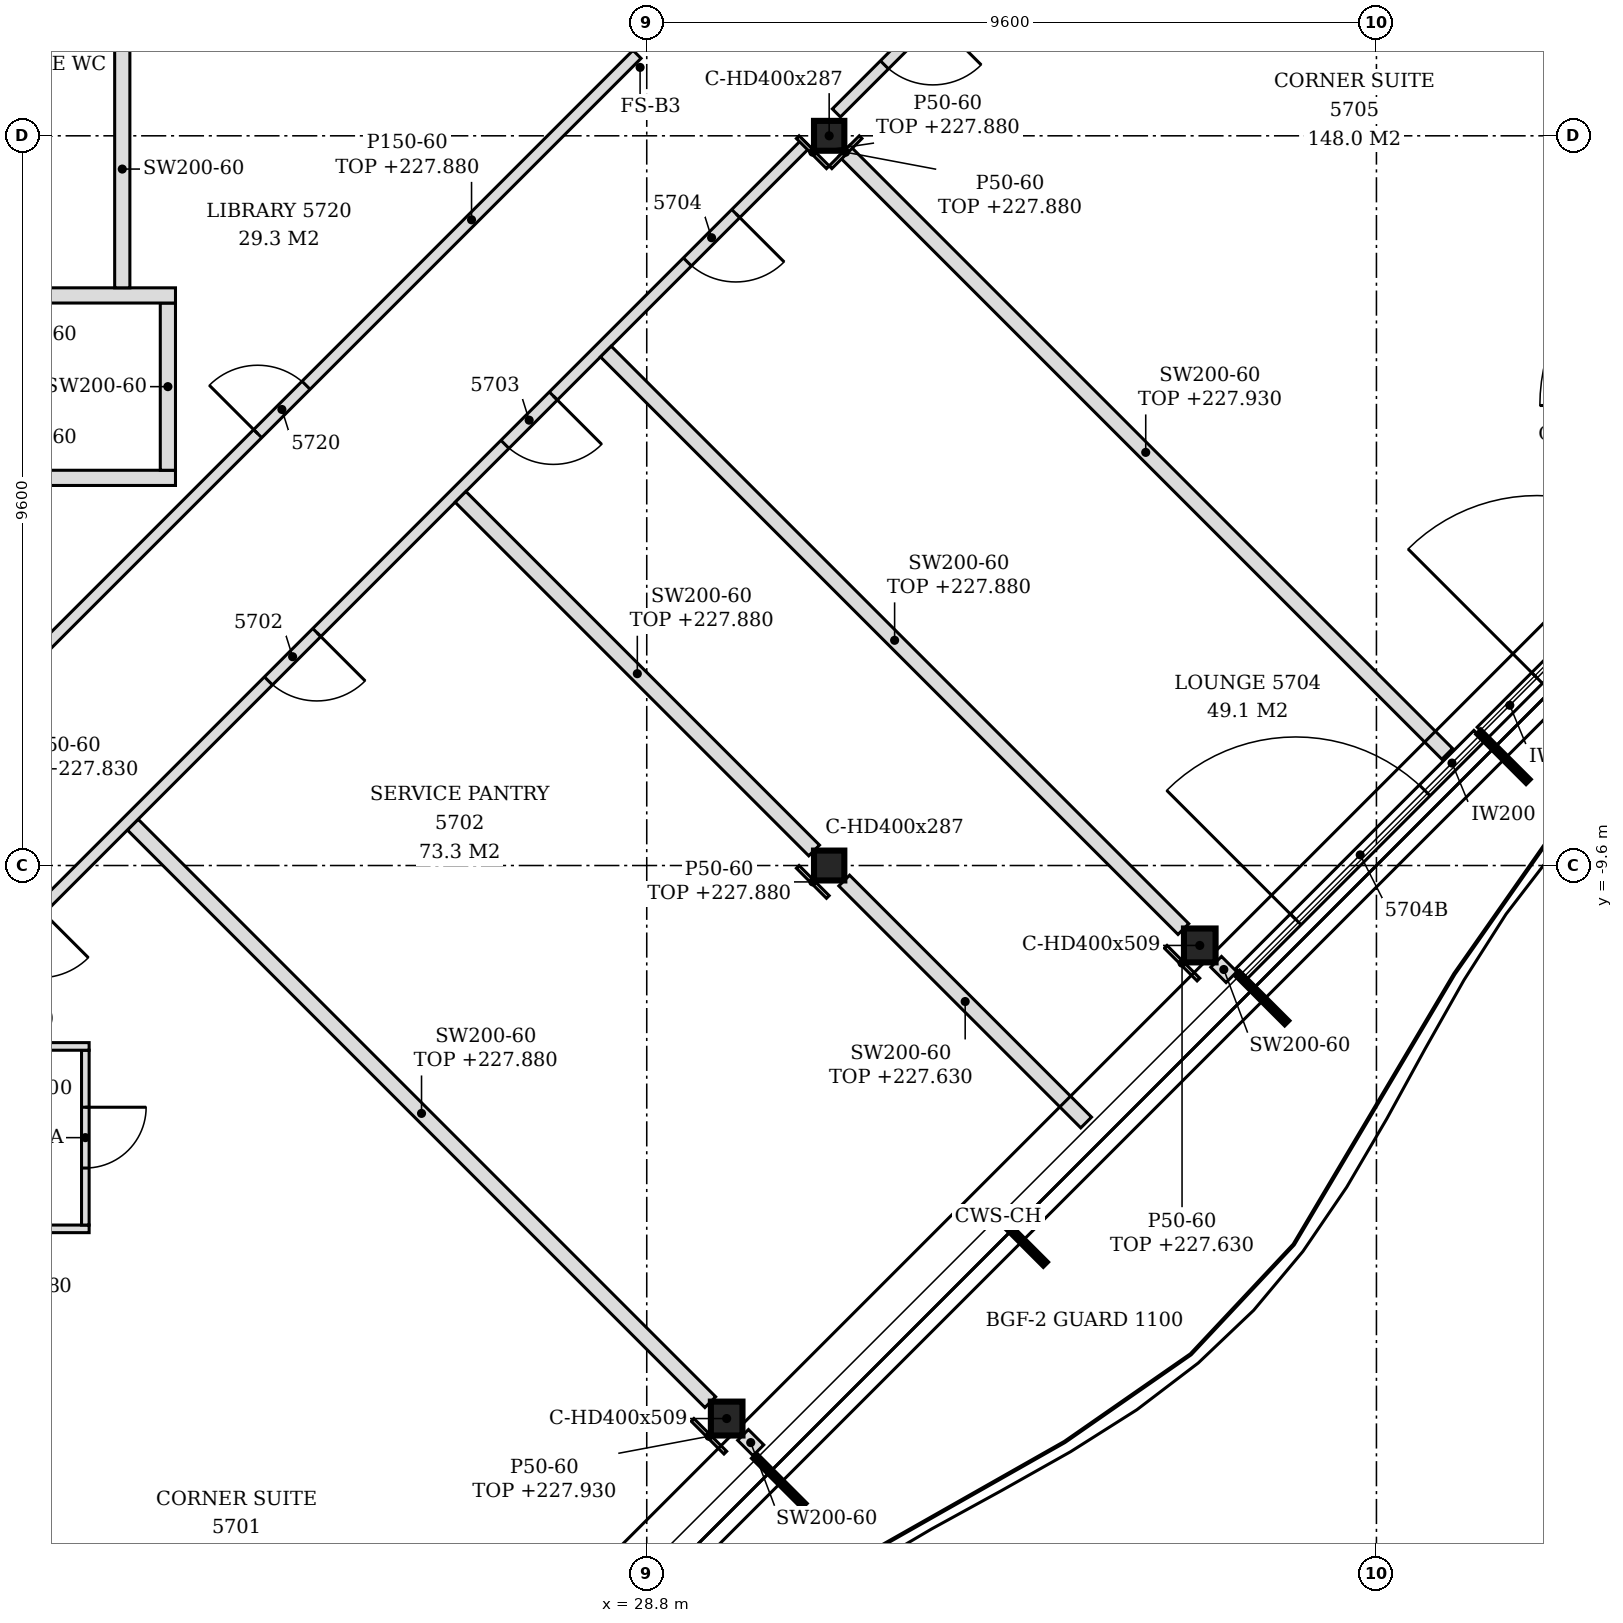
"""IFC4 building model, lengths in metres.
Left out: names, types, materials, properties, quantities, classifications, styles, units other than length and angle.
Written with IfcOpenShell. Run it as: python <this file> out.ifc"""

import sys

from ifc_helpers import new_model, si_unit, direction, frame, frame_2d, origin, origin_2d, place, context, subcontext, project, spatial, polyline, rectangle, i_section, outline, extrude, element, fill, save


model = new_model("IFC4")
c1 = context("Model", 3, precision=1e-05, world=origin(), true_north=direction((0.0, 1.0)))
c2 = subcontext(c1, "Body", "Model", "MODEL_VIEW")
j1 = project(units=[si_unit("LENGTHUNIT", "METRE"), si_unit("PLANEANGLEUNIT", "RADIAN")], contexts=[c1])
p1 = place(None, origin())
s1 = spatial("IfcSite", under=j1, at=p1, CompositionType="ELEMENT")
p2 = place(p1, origin())
s2 = spatial("IfcBuilding", under=s1, at=p2, CompositionType="ELEMENT")
p3 = place(p2, frame((0.0, 0.0, 225.0)))
s3 = spatial("IfcBuildingStorey", under=s2, at=p3, CompositionType="ELEMENT", Elevation=225.0)
for number, where, z_axis, x_axis in (
    (1, (29.852, -16.876, -0.15), (0.0, 0.0, 1.0), (1.0, 0.0, 0.0)),
    (2, (36.076, -10.652, -0.15), (0.0, 0.0, 1.0), (1.0, 0.0, 0.0)),
):
    element("IfcColumn", number, at=place(p3, frame(where, z_axis=z_axis, x_axis=x_axis)), inside=s3, PredefinedType="COLUMN", context=c2, shape_type="SweptSolid", body=[
        extrude(i_section(OverallWidth=0.416, OverallDepth=0.446, WebThickness=0.039, FlangeThickness=0.063, FilletRadius=0.015, at=origin_2d()), origin(), (0.0, 0.0, 1.0), 3.6),
    ])
for number, where, z_axis, x_axis in (
    (3, (31.2, -9.6, -0.15), (0.0, 0.0, 1.0), (1.0, 0.0, 0.0)),
    (4, (31.2, 0.0, -0.15), (0.0, 0.0, 1.0), (1.0, 0.0, 0.0)),
):
    element("IfcColumn", number, at=place(p3, frame(where, z_axis=z_axis, x_axis=x_axis)), inside=s3, PredefinedType="COLUMN", context=c2, shape_type="SweptSolid", body=[
        extrude(i_section(OverallWidth=0.399, OverallDepth=0.393, WebThickness=0.023, FlangeThickness=0.037, FilletRadius=0.015, at=origin_2d()), origin(), (0.0, 0.0, 1.0), 3.6),
    ])
p4 = place(p3, frame((36.62, -11.026, 0.0), z_axis=(0.0, 0.0, 1.0), x_axis=(0.707106781187, 0.707106781187, 0.0)))
e5 = element("IfcWall", 5, at=p4, inside=s3, PredefinedType="NOTDEFINED", context=c2, shape_type="SweptSolid", body=[
    extrude(rectangle(XDim=4.431, YDim=0.2, at=frame_2d((2.215, 0.0))), origin(), (0.0, 0.0, 1.0), 3.45),
])
p5 = place(p4, frame((1.015, 0.0, 0.0)))
e6 = element("IfcOpeningElement", 6, at=p5, cuts=e5, PredefinedType="OPENING", context=c2, shape_type="SweptSolid", body=[
    extrude(rectangle(XDim=2.4, YDim=2.4, at=frame_2d((1.2, 1.2))), frame((0.0, 0.11, 0.0), z_axis=(0.0, -1.0, 0.0), x_axis=(1.0, 0.0, 0.0)), (0.0, 0.0, 1.0), 0.22),
])
p6 = place(p3, frame((39.796, -7.851, 0.0), z_axis=(0.0, 0.0, 1.0), x_axis=(0.707079168996, 0.707134392299, 0.0)))
e7 = element("IfcWall", 7, at=p6, inside=s3, PredefinedType="NOTDEFINED", context=c2, shape_type="SweptSolid", body=[
    extrude(rectangle(XDim=4.421, YDim=0.2, at=frame_2d((2.21, 0.0))), origin(), (0.0, 0.0, 1.0), 3.45),
])
p7 = place(p6, frame((1.015, 0.0, 0.0)))
e8 = element("IfcOpeningElement", 8, at=p7, cuts=e7, PredefinedType="OPENING", context=c2, shape_type="SweptSolid", body=[
    extrude(rectangle(XDim=2.4, YDim=2.4, at=frame_2d((1.2, 1.2))), frame((0.0, 0.11, 0.0), z_axis=(0.0, -1.0, 0.0), x_axis=(1.0, 0.0, 0.0)), (0.0, 0.0, 1.0), 0.22),
])
p8 = place(p3, frame((30.269, -17.293, 0.0), z_axis=(0.0, 0.0, 1.0), x_axis=(-0.707106781187, 0.707106781187, 0.0)))
e9 = element("IfcWall", 9, at=p8, inside=s3, PredefinedType="PARTITIONING", context=c2, shape_type="SweptSolid", body=[
    extrude(rectangle(XDim=0.285, YDim=0.2, at=frame_2d((0.143, 0.0))), origin(), (0.0, 0.0, 1.0), 3.45),
])
p9 = place(p3, frame((29.636, -16.66, 0.0), z_axis=(0.0, 0.0, 1.0), x_axis=(-0.707095420673, 0.707118141518, 0.0)))
e10 = element("IfcWall", 10, at=p9, inside=s3, PredefinedType="PARTITIONING", context=c2, shape_type="SweptSolid", body=[
    extrude(rectangle(XDim=10.745, YDim=0.2, at=frame_2d((5.373, 0.0))), origin(), (0.0, 0.0, 1.0), 2.88),
])
p10 = place(p3, frame((19.114, -14.38, 0.0), z_axis=(0.0, 0.0, 1.0), x_axis=(1.0, 0.0, 0.0)))
e11 = element("IfcWall", 11, at=p10, inside=s3, PredefinedType="PARTITIONING", context=c2, shape_type="SweptSolid", body=[
    extrude(outline(polyline([(0.0, 0.0), (2.35, 0.0), (2.35, 2.88), (0.236, 2.88), (0.234, 2.73), (0.0, 2.73), (0.0, 0.0)])), frame((0.0, 0.05, 0.0), z_axis=(0.0, -1.0, 0.0), x_axis=(1.0, 0.0, 0.0)), (0.0, 0.0, 1.0), 0.1),
])
p11 = place(p3, frame((16.722, -14.272, 0.0), z_axis=(0.0, 0.0, 1.0), x_axis=(0.707106781187, 0.707106781187, 0.0)))
e12 = element("IfcWall", 12, at=p11, inside=s3, PredefinedType="PARTITIONING", context=c2, shape_type="SweptSolid", body=[
    extrude(rectangle(XDim=20.049, YDim=0.15, at=frame_2d((10.025, 0.0))), origin(), (0.0, 0.0, 1.0), 2.73),
])
p12 = place(p11, frame((4.892, 0.0, 0.0)))
e13 = element("IfcOpeningElement", 13, at=p12, cuts=e12, PredefinedType="OPENING", context=c2, shape_type="SweptSolid", body=[
    extrude(rectangle(XDim=0.9, YDim=2.1, at=frame_2d((0.45, 1.05))), frame((0.0, 0.085, 0.0), z_axis=(0.0, -1.0, 0.0), x_axis=(1.0, 0.0, 0.0)), (0.0, 0.0, 1.0), 0.17),
])
p13 = place(p11, frame((10.042, 0.0, 0.0)))
e14 = element("IfcOpeningElement", 14, at=p13, cuts=e12, PredefinedType="OPENING", context=c2, shape_type="SweptSolid", body=[
    extrude(rectangle(XDim=0.9, YDim=2.1, at=frame_2d((0.45, 1.05))), frame((0.0, 0.085, 0.0), z_axis=(0.0, -1.0, 0.0), x_axis=(1.0, 0.0, 0.0)), (0.0, 0.0, 1.0), 0.17),
])
p14 = place(p11, frame((14.443, 0.0, 0.0)))
e15 = element("IfcOpeningElement", 15, at=p14, cuts=e12, PredefinedType="OPENING", context=c2, shape_type="SweptSolid", body=[
    extrude(rectangle(XDim=0.9, YDim=2.1, at=frame_2d((0.45, 1.05))), frame((0.0, 0.085, 0.0), z_axis=(0.0, -1.0, 0.0), x_axis=(1.0, 0.0, 0.0)), (0.0, 0.0, 1.0), 0.17),
])
p15 = place(p11, frame((17.837, 0.0, 0.0)))
e16 = element("IfcOpeningElement", 16, at=p15, cuts=e12, PredefinedType="OPENING", context=c2, shape_type="SweptSolid", body=[
    extrude(rectangle(XDim=0.9, YDim=2.1, at=frame_2d((0.45, 1.05))), frame((0.0, 0.085, 0.0), z_axis=(0.0, -1.0, 0.0), x_axis=(1.0, 0.0, 0.0)), (0.0, 0.0, 1.0), 0.17),
])
p16 = place(p3, frame((21.414, -14.33, 0.0), z_axis=(0.0, 0.0, 1.0), x_axis=(0.0, 1.0, 0.0)))
e17 = element("IfcWall", 17, at=p16, inside=s3, PredefinedType="PARTITIONING", context=c2, shape_type="SweptSolid", body=[
    extrude(outline(polyline([(0.0, 0.0), (2.3, 0.0), (2.3, 3.45), (0.035, 3.45), (0.033, 2.88), (0.0, 2.88), (0.0, 0.0)])), frame((0.0, 0.05, 0.0), z_axis=(0.0, -1.0, 0.0), x_axis=(1.0, 0.0, 0.0)), (0.0, 0.0, 1.0), 0.1),
])
p17 = place(p16, frame((0.75, 0.0, 0.0)))
e18 = element("IfcOpeningElement", 18, at=p17, cuts=e17, PredefinedType="OPENING", context=c2, shape_type="SweptSolid", body=[
    extrude(rectangle(XDim=0.8, YDim=2.1, at=frame_2d((0.4, 1.05))), frame((0.0, 0.06, 0.0), z_axis=(0.0, -1.0, 0.0), x_axis=(1.0, 0.0, 0.0)), (0.0, 0.0, 1.0), 0.12),
])
p18 = place(p3, frame((34.581, -12.981, 0.0), z_axis=(0.0, 0.0, 1.0), x_axis=(-0.707133900936, 0.707079660397, 0.0)))
e19 = element("IfcWall", 19, at=p18, inside=s3, PredefinedType="PARTITIONING", context=c2, shape_type="SweptSolid", body=[
    extrude(rectangle(XDim=4.501, YDim=0.2, at=frame_2d((2.25, 0.0))), origin(), (0.0, 0.0, 1.0), 2.63),
])
p19 = place(p3, frame((19.17, -11.98, 0.0), z_axis=(0.0, 0.0, 1.0), x_axis=(1.0, 0.0, 0.0)))
e20 = element("IfcWall", 20, at=p19, inside=s3, PredefinedType="PARTITIONING", context=c2, shape_type="SweptSolid", body=[
    extrude(outline(polyline([(0.0, 0.0), (2.294, 0.0), (2.294, 3.45), (0.18, 3.45), (0.178, 2.73), (0.0, 2.73), (0.0, 0.0)])), frame((0.0, 0.05, 0.0), z_axis=(0.0, -1.0, 0.0), x_axis=(1.0, 0.0, 0.0)), (0.0, 0.0, 1.0), 0.1),
])
p20 = place(p3, frame((36.493, -11.069, 0.0), z_axis=(0.0, 0.0, 1.0), x_axis=(-0.707534423513, 0.706678880075, 0.0)))
e21 = element("IfcWall", 21, at=p20, inside=s3, PredefinedType="PARTITIONING", context=c2, shape_type="SweptSolid", body=[
    extrude(rectangle(XDim=0.285, YDim=0.2, at=frame_2d((0.143, 0.0))), origin(), (0.0, 0.0, 1.0), 3.45),
])
p21 = place(p3, frame((35.86, -10.436, 0.0), z_axis=(0.0, 0.0, 1.0), x_axis=(-0.707106781187, 0.707106781187, 0.0)))
e22 = element("IfcWall", 22, at=p21, inside=s3, PredefinedType="PARTITIONING", context=c2, shape_type="SweptSolid", body=[
    extrude(rectangle(XDim=10.745, YDim=0.2, at=frame_2d((5.373, 0.0))), origin(), (0.0, 0.0, 1.0), 2.88),
])
p22 = place(p3, frame((31.002, -9.402, 0.0), z_axis=(0.0, 0.0, 1.0), x_axis=(-0.707088226093, 0.707125335793, 0.0)))
e23 = element("IfcWall", 23, at=p22, inside=s3, PredefinedType="PARTITIONING", context=c2, shape_type="SweptSolid", body=[
    extrude(rectangle(XDim=6.579, YDim=0.2, at=frame_2d((3.29, 0.0))), origin(), (0.0, 0.0, 1.0), 2.88),
])
p23 = place(p3, frame((19.398, -8.202, 0.0), z_axis=(0.0, 0.0, 1.0), x_axis=(0.707116088468, 0.707097473782, 0.0)))
e24 = element("IfcWall", 24, at=p23, inside=s3, PredefinedType="PARTITIONING", context=c2, shape_type="SweptSolid", body=[
    extrude(rectangle(XDim=13.115, YDim=0.15, at=frame_2d((6.558, 0.0))), origin(), (0.0, 0.0, 1.0), 2.88),
])
p24 = place(p23, frame((6.058, 0.0, 0.0)))
e25 = element("IfcOpeningElement", 25, at=p24, cuts=e24, PredefinedType="OPENING", context=c2, shape_type="SweptSolid", body=[
    extrude(rectangle(XDim=0.9, YDim=2.1, at=frame_2d((0.45, 1.05))), frame((0.0, 0.085, 0.0), z_axis=(0.0, -1.0, 0.0), x_axis=(1.0, 0.0, 0.0)), (0.0, 0.0, 1.0), 0.17),
])
p25 = place(p3, frame((39.331, -8.131, 0.0), z_axis=(0.0, 0.0, 1.0), x_axis=(-0.707106781187, 0.707106781187, 0.0)))
e26 = element("IfcWall", 26, at=p25, inside=s3, PredefinedType="PARTITIONING", context=c2, shape_type="SweptSolid", body=[
    extrude(rectangle(XDim=11.219, YDim=0.2, at=frame_2d((5.61, 0.0))), origin(), (0.0, 0.0, 1.0), 2.93),
])
p26 = place(p3, frame((19.275, -4.5, 0.0), z_axis=(0.0, 0.0, 1.0), x_axis=(1.0, 0.0, 0.0)))
e27 = element("IfcWall", 27, at=p26, inside=s3, PredefinedType="PARTITIONING", context=c2, shape_type="SweptSolid", body=[
    extrude(outline(polyline([(0.0, 0.0), (3.325, 0.0), (3.325, 3.45), (0.075, 3.45), (0.073, 2.83), (0.0, 2.83), (0.0, 0.0)])), frame((0.0, 0.1, 0.0), z_axis=(0.0, -1.0, 0.0), x_axis=(1.0, 0.0, 0.0)), (0.0, 0.0, 1.0), 0.2),
])
p27 = place(p3, frame((22.5, -4.4, 0.0), z_axis=(0.0, 0.0, 1.0), x_axis=(0.0, 1.0, 0.0)))
e28 = element("IfcWall", 28, at=p27, inside=s3, PredefinedType="PARTITIONING", context=c2, shape_type="SweptSolid", body=[
    extrude(rectangle(XDim=2.2, YDim=0.2, at=frame_2d((1.1, 0.0))), origin(), (0.0, 0.0, 1.0), 3.45),
])
p28 = place(p3, frame((19.275, -2.1, 0.0), z_axis=(0.0, 0.0, 1.0), x_axis=(1.0, 0.0, 0.0)))
e29 = element("IfcWall", 29, at=p28, inside=s3, PredefinedType="PARTITIONING", context=c2, shape_type="SweptSolid", body=[
    extrude(outline(polyline([(0.0, 0.0), (3.325, 0.0), (3.325, 3.45), (0.075, 3.45), (0.073, 2.83), (0.0, 2.83), (0.0, 0.0)])), frame((0.0, 0.1, 0.0), z_axis=(0.0, -1.0, 0.0), x_axis=(1.0, 0.0, 0.0)), (0.0, 0.0, 1.0), 0.2),
])
p29 = place(p3, frame((21.9, -2.0, 0.0), z_axis=(0.0, 0.0, 1.0), x_axis=(0.0, 1.0, 0.0)))
e30 = element("IfcWall", 30, at=p29, inside=s3, PredefinedType="PARTITIONING", context=c2, shape_type="SweptSolid", body=[
    extrude(outline(polyline([(0.0, 0.0), (3.125, 0.0), (3.125, 3.45), (2.105, 3.45), (2.103, 2.88), (1.895, 2.88), (1.893, 3.45), (0.0, 3.45), (0.0, 0.0)])), frame((0.0, 0.1, 0.0), z_axis=(0.0, -1.0, 0.0), x_axis=(1.0, 0.0, 0.0)), (0.0, 0.0, 1.0), 0.2),
])
p30 = place(p3, frame((31.295, 0.301, 0.0), z_axis=(0.0, 0.0, 1.0), x_axis=(0.707146890479, 0.707066669618, 0.0)))
e31 = element("IfcWall", 31, at=p30, inside=s3, PredefinedType="PARTITIONING", context=c2, shape_type="SweptSolid", body=[
    extrude(rectangle(XDim=3.043, YDim=0.15, at=frame_2d((1.522, 0.0))), origin(), (0.0, 0.0, 1.0), 2.93),
])
p31 = place(p30, frame((0.895, 0.0, 0.0)))
e32 = element("IfcOpeningElement", 32, at=p31, cuts=e31, PredefinedType="OPENING", context=c2, shape_type="SweptSolid", body=[
    extrude(rectangle(XDim=0.9, YDim=2.1, at=frame_2d((0.45, 1.05))), frame((0.0, 0.085, 0.0), z_axis=(0.0, -1.0, 0.0), x_axis=(1.0, 0.0, 0.0)), (0.0, 0.0, 1.0), 0.17),
])
p32 = place(p3, frame((29.834, -17.324, 0.0), z_axis=(0.0, 0.0, 1.0), x_axis=(-0.706906496032, 0.707307009627, 0.0)))
e33 = element("IfcWall", 33, at=p32, inside=s3, PredefinedType="PARTITIONING", context=c2, shape_type="SweptSolid", body=[
    extrude(rectangle(XDim=0.61, YDim=0.05, at=frame_2d((0.305, 0.0))), origin(), (0.0, 0.0, 1.0), 2.93),
])
p33 = place(p3, frame((31.218, -0.414, 0.0), z_axis=(0.0, 0.0, 1.0), x_axis=(0.706888841063, 0.707324654159, 0.0)))
e34 = element("IfcWall", 34, at=p33, inside=s3, PredefinedType="PARTITIONING", context=c2, shape_type="SweptSolid", body=[
    extrude(rectangle(XDim=0.56, YDim=0.05, at=frame_2d((0.28, 0.0))), origin(), (0.0, 0.0, 1.0), 2.88),
])
p34 = place(p3, frame((31.182, -10.014, 0.0), z_axis=(0.0, 0.0, 1.0), x_axis=(-0.707106781187, 0.707106781187, 0.0)))
e35 = element("IfcWall", 35, at=p34, inside=s3, PredefinedType="PARTITIONING", context=c2, shape_type="SweptSolid", body=[
    extrude(rectangle(XDim=0.56, YDim=0.05, at=frame_2d((0.28, 0.0))), origin(), (0.0, 0.0, 1.0), 2.88),
])
p35 = place(p3, frame((36.058, -11.1, 0.0), z_axis=(0.0, 0.0, 1.0), x_axis=(-0.707307009627, 0.706906496032, 0.0)))
e36 = element("IfcWall", 36, at=p35, inside=s3, PredefinedType="PARTITIONING", context=c2, shape_type="SweptSolid", body=[
    extrude(rectangle(XDim=0.61, YDim=0.05, at=frame_2d((0.305, 0.0))), origin(), (0.0, 0.0, 1.0), 2.63),
])
p36 = place(p3, frame((31.182, -0.414, 0.0), z_axis=(0.0, 0.0, 1.0), x_axis=(-0.706888841063, 0.707324654159, 0.0)))
e37 = element("IfcWall", 37, at=p36, inside=s3, PredefinedType="PARTITIONING", context=c2, shape_type="SweptSolid", body=[
    extrude(rectangle(XDim=0.56, YDim=0.05, at=frame_2d((0.28, 0.0))), origin(), (0.0, 0.0, 1.0), 2.88),
])
p37 = place(p5, origin())
e38 = element("IfcDoor", 38, at=p37, inside=s3, OperationType="SINGLE_SWING_LEFT", PredefinedType="DOOR", context=c2, shape_type="SweptSolid", body=[
    extrude(rectangle(XDim=2.4, YDim=2.4, at=frame_2d((1.2, 1.2))), frame((0.0, 0.025, 0.0), z_axis=(0.0, -1.0, 0.0), x_axis=(1.0, 0.0, 0.0)), (0.0, 0.0, 1.0), 0.05),
])
fill(e6, e38)
p38 = place(p7, origin())
e39 = element("IfcDoor", 39, at=p38, inside=s3, OperationType="SINGLE_SWING_LEFT", PredefinedType="DOOR", context=c2, shape_type="SweptSolid", body=[
    extrude(rectangle(XDim=2.4, YDim=2.4, at=frame_2d((1.2, 1.2))), frame((0.0, 0.025, 0.0), z_axis=(0.0, -1.0, 0.0), x_axis=(1.0, 0.0, 0.0)), (0.0, 0.0, 1.0), 0.05),
])
fill(e8, e39)
p39 = place(p17, frame((0.8, 0.0, 0.0), z_axis=(0.0, 0.0, 1.0), x_axis=(-1.0, 0.0, 0.0)))
e40 = element("IfcDoor", 40, at=p39, inside=s3, OperationType="SINGLE_SWING_LEFT", PredefinedType="DOOR", context=c2, shape_type="SweptSolid", body=[
    extrude(rectangle(XDim=0.8, YDim=2.1, at=frame_2d((0.4, 1.05))), frame((0.0, 0.025, 0.0), z_axis=(0.0, -1.0, 0.0), x_axis=(1.0, 0.0, 0.0)), (0.0, 0.0, 1.0), 0.05),
])
fill(e18, e40)
p40 = place(p13, frame((0.9, 0.0, 0.0), z_axis=(0.0, 0.0, 1.0), x_axis=(-1.0, 0.0, 0.0)))
e41 = element("IfcDoor", 41, at=p40, inside=s3, OperationType="SINGLE_SWING_LEFT", PredefinedType="DOOR", context=c2, shape_type="SweptSolid", body=[
    extrude(rectangle(XDim=0.9, YDim=2.1, at=frame_2d((0.45, 1.05))), frame((0.0, 0.025, 0.0), z_axis=(0.0, -1.0, 0.0), x_axis=(1.0, 0.0, 0.0)), (0.0, 0.0, 1.0), 0.05),
])
fill(e14, e41)
p41 = place(p14, frame((0.9, 0.0, 0.0), z_axis=(0.0, 0.0, 1.0), x_axis=(-1.0, 0.0, 0.0)))
e42 = element("IfcDoor", 42, at=p41, inside=s3, OperationType="SINGLE_SWING_LEFT", PredefinedType="DOOR", context=c2, shape_type="SweptSolid", body=[
    extrude(rectangle(XDim=0.9, YDim=2.1, at=frame_2d((0.45, 1.05))), frame((0.0, 0.025, 0.0), z_axis=(0.0, -1.0, 0.0), x_axis=(1.0, 0.0, 0.0)), (0.0, 0.0, 1.0), 0.05),
])
fill(e15, e42)
p42 = place(p15, frame((0.9, 0.0, 0.0), z_axis=(0.0, 0.0, 1.0), x_axis=(-1.0, 0.0, 0.0)))
e43 = element("IfcDoor", 43, at=p42, inside=s3, OperationType="SINGLE_SWING_LEFT", PredefinedType="DOOR", context=c2, shape_type="SweptSolid", body=[
    extrude(rectangle(XDim=0.9, YDim=2.1, at=frame_2d((0.45, 1.05))), frame((0.0, 0.025, 0.0), z_axis=(0.0, -1.0, 0.0), x_axis=(1.0, 0.0, 0.0)), (0.0, 0.0, 1.0), 0.05),
])
fill(e16, e43)
p43 = place(p31, frame((0.9, 0.0, 0.0), z_axis=(0.0, 0.0, 1.0), x_axis=(-1.0, 0.0, 0.0)))
e44 = element("IfcDoor", 44, at=p43, inside=s3, OperationType="SINGLE_SWING_LEFT", PredefinedType="DOOR", context=c2, shape_type="SweptSolid", body=[
    extrude(rectangle(XDim=0.9, YDim=2.1, at=frame_2d((0.45, 1.05))), frame((0.0, 0.025, 0.0), z_axis=(0.0, -1.0, 0.0), x_axis=(1.0, 0.0, 0.0)), (0.0, 0.0, 1.0), 0.05),
])
fill(e32, e44)
p44 = place(p24, origin())
e45 = element("IfcDoor", 45, at=p44, inside=s3, OperationType="SINGLE_SWING_LEFT", PredefinedType="DOOR", context=c2, shape_type="SweptSolid", body=[
    extrude(rectangle(XDim=0.9, YDim=2.1, at=frame_2d((0.45, 1.05))), frame((0.0, 0.025, 0.0), z_axis=(0.0, -1.0, 0.0), x_axis=(1.0, 0.0, 0.0)), (0.0, 0.0, 1.0), 0.05),
])
fill(e25, e45)
save(model, sys.argv[1])
